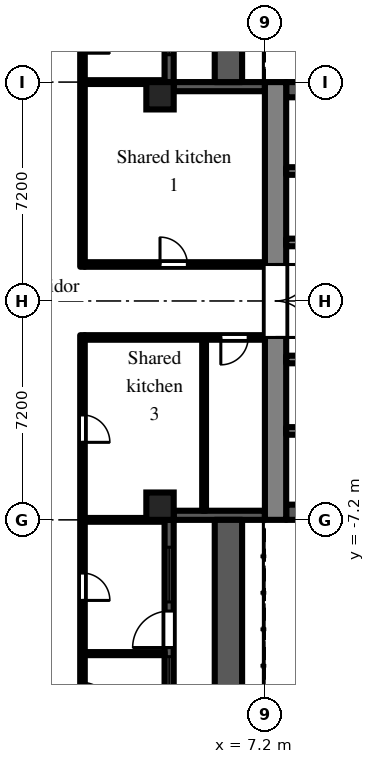
"""IFC4 building model, lengths in metres.
Left out: names, types, materials, properties, quantities, classifications, styles, units other than length and angle.
Written with IfcOpenShell. Run it as: python <this file> out.ifc"""

import sys

from ifc_helpers import new_model, si_unit, direction, frame, frame_2d, origin, origin_2d, place, context, subcontext, project, spatial, rectangle, extrude, element, fill, save


model = new_model("IFC4")
c1 = context("Model", 3, precision=1e-05, world=origin(), true_north=direction((0.0, 1.0)))
c2 = subcontext(c1, "Body", "Model", "MODEL_VIEW")
j1 = project(units=[si_unit("LENGTHUNIT", "METRE"), si_unit("PLANEANGLEUNIT", "RADIAN")], contexts=[c1])
p1 = place(None, origin())
s1 = spatial("IfcSite", under=j1, at=p1, CompositionType="ELEMENT")
p2 = place(p1, origin())
s2 = spatial("IfcBuilding", under=s1, at=p2, CompositionType="ELEMENT")
p3 = place(p2, frame((0.0, 0.0, 66.9)))
s3 = spatial("IfcBuildingStorey", under=s2, at=p3, CompositionType="ELEMENT", Elevation=66.9)
for number, where, z_axis, x_axis in (
    (1, (3.75, -6.75, 0.0), (0.0, 0.0, 1.0), (1.0, 0.0, 0.0)),
    (2, (3.75, 6.75, 0.0), (0.0, 0.0, 1.0), (1.0, 0.0, 0.0)),
):
    element("IfcColumn", number, at=place(p3, frame(where, z_axis=z_axis, x_axis=x_axis)), inside=s3, PredefinedType="COLUMN", context=c2, shape_type="SweptSolid", body=[
        extrude(rectangle(XDim=0.9, YDim=0.9, at=origin_2d()), origin(), (0.0, 0.0, 1.0), 3.0),
    ])
p4 = place(p3, frame((7.2, 7.05, 0.0), z_axis=(0.0, 0.0, 1.0), x_axis=(-1.0, 0.0, 0.0)))
e3 = element("IfcWall", 3, at=p4, inside=s3, PredefinedType="SOLIDWALL", context=c2, shape_type="SweptSolid", body=[
    extrude(rectangle(XDim=3.0, YDim=0.3, at=frame_2d((1.5, 0.0))), origin(), (0.0, 0.0, 1.0), 2.1),
])
p5 = place(p3, frame((4.05, 7.2, 0.0), z_axis=(0.0, 0.0, 1.0), x_axis=(0.0, 1.0, 0.0)))
e4 = element("IfcWall", 4, at=p5, inside=s3, PredefinedType="SOLIDWALL", context=c2, shape_type="SweptSolid", body=[
    extrude(rectangle(XDim=7.2, YDim=0.3, at=frame_2d((3.6, 0.0))), origin(), (0.0, 0.0, 1.0), 2.1),
])
p6 = place(p5, frame((3.0, 0.0, 0.0)))
e5 = element("IfcOpeningElement", 5, at=p6, cuts=e4, PredefinedType="OPENING", context=c2, shape_type="SweptSolid", body=[
    extrude(rectangle(XDim=1.2, YDim=2.05, at=frame_2d((0.6, 1.025))), frame((0.0, 0.16, 0.0), z_axis=(0.0, -1.0, 0.0), x_axis=(1.0, 0.0, 0.0)), (0.0, 0.0, 1.0), 0.32),
])
p7 = place(p5, frame((0.9, 0.0, 0.2)))
e6 = element("IfcOpeningElement", 6, at=p7, cuts=e4, PredefinedType="OPENING", context=c2, shape_type="SweptSolid", body=[
    extrude(rectangle(XDim=1.8, YDim=1.85, at=frame_2d((0.9, 0.925))), frame((0.0, 0.16, 0.0), z_axis=(0.0, -1.0, 0.0), x_axis=(1.0, 0.0, 0.0)), (0.0, 0.0, 1.0), 0.32),
])
p8 = place(p5, frame((4.5, 0.0, 0.2)))
e7 = element("IfcOpeningElement", 7, at=p8, cuts=e4, PredefinedType="OPENING", context=c2, shape_type="SweptSolid", body=[
    extrude(rectangle(XDim=1.8, YDim=1.85, at=frame_2d((0.9, 0.925))), frame((0.0, 0.16, 0.0), z_axis=(0.0, -1.0, 0.0), x_axis=(1.0, 0.0, 0.0)), (0.0, 0.0, 1.0), 0.32),
])
p9 = place(p3, frame((4.05, -14.4, 0.0), z_axis=(0.0, 0.0, 1.0), x_axis=(0.0, 1.0, 0.0)))
e8 = element("IfcWall", 8, at=p9, inside=s3, PredefinedType="SOLIDWALL", context=c2, shape_type="SweptSolid", body=[
    extrude(rectangle(XDim=7.2, YDim=0.3, at=frame_2d((3.6, 0.0))), origin(), (0.0, 0.0, 1.0), 2.1),
])
p10 = place(p9, frame((3.0, 0.0, 0.0)))
e9 = element("IfcOpeningElement", 9, at=p10, cuts=e8, PredefinedType="OPENING", context=c2, shape_type="SweptSolid", body=[
    extrude(rectangle(XDim=1.2, YDim=2.05, at=frame_2d((0.6, 1.025))), frame((0.0, 0.16, 0.0), z_axis=(0.0, -1.0, 0.0), x_axis=(1.0, 0.0, 0.0)), (0.0, 0.0, 1.0), 0.32),
])
p11 = place(p9, frame((0.9, 0.0, 0.2)))
e10 = element("IfcOpeningElement", 10, at=p11, cuts=e8, PredefinedType="OPENING", context=c2, shape_type="SweptSolid", body=[
    extrude(rectangle(XDim=1.8, YDim=1.85, at=frame_2d((0.9, 0.925))), frame((0.0, 0.16, 0.0), z_axis=(0.0, -1.0, 0.0), x_axis=(1.0, 0.0, 0.0)), (0.0, 0.0, 1.0), 0.32),
])
p12 = place(p9, frame((4.5, 0.0, 0.2)))
e11 = element("IfcOpeningElement", 11, at=p12, cuts=e8, PredefinedType="OPENING", context=c2, shape_type="SweptSolid", body=[
    extrude(rectangle(XDim=1.8, YDim=1.85, at=frame_2d((0.9, 0.925))), frame((0.0, 0.16, 0.0), z_axis=(0.0, -1.0, 0.0), x_axis=(1.0, 0.0, 0.0)), (0.0, 0.0, 1.0), 0.32),
])
p13 = place(p3, frame((4.2, -7.05, 0.0), z_axis=(0.0, 0.0, 1.0), x_axis=(1.0, 0.0, 0.0)))
e12 = element("IfcWall", 12, at=p13, inside=s3, PredefinedType="SOLIDWALL", context=c2, shape_type="SweptSolid", body=[
    extrude(rectangle(XDim=3.0, YDim=0.3, at=frame_2d((1.5, 0.0))), origin(), (0.0, 0.0, 1.0), 2.1),
])
for number, where, z_axis, x_axis in (
    (13, (6.0, 7.2, 0.0), (0.0, 0.0, 1.0), (0.0, 1.0, 0.0)),
    (14, (6.0, -14.4, 0.0), (0.0, 0.0, 1.0), (0.0, 1.0, 0.0)),
):
    element("IfcWall", number, at=place(p3, frame(where, z_axis=z_axis, x_axis=x_axis)), inside=s3, PredefinedType="PARAPET", context=c2, shape_type="SweptSolid", body=[
        extrude(rectangle(XDim=7.2, YDim=0.9, at=frame_2d((3.6, 0.0))), origin(), (0.0, 0.0, 1.0), 0.8),
    ])
p14 = place(p3, frame((7.55, -7.2, 0.0), z_axis=(0.0, 0.0, 1.0), x_axis=(0.0, 1.0, 0.0)))
e15 = element("IfcWall", 15, at=p14, inside=s3, PredefinedType="SHEAR", context=c2, shape_type="SweptSolid", body=[
    extrude(rectangle(XDim=14.4, YDim=0.7, at=frame_2d((7.2, 0.0))), origin(), (0.0, 0.0, 1.0), 2.575),
])
p15 = place(p14, frame((6.0, 0.0, 0.0)))
e16 = element("IfcOpeningElement", 16, at=p15, cuts=e15, PredefinedType="OPENING", context=c2, shape_type="SweptSolid", body=[
    extrude(rectangle(XDim=2.4, YDim=2.2, at=frame_2d((1.2, 1.1))), frame((0.0, 0.36, 0.0), z_axis=(0.0, -1.0, 0.0), x_axis=(1.0, 0.0, 0.0)), (0.0, 0.0, 1.0), 0.72),
])
p16 = place(p3, frame((7.9, 6.95, 0.0), z_axis=(0.0, 0.0, 1.0), x_axis=(1.0, 0.0, 0.0)))
e17 = element("IfcWall", 17, at=p16, inside=s3, PredefinedType="SHEAR", context=c2, shape_type="SweptSolid", body=[
    extrude(rectangle(XDim=12.95, YDim=0.5, at=frame_2d((6.475, 0.0))), origin(), (0.0, 0.0, 1.0), 2.575),
])
p17 = place(p3, frame((7.9, 1.925, 0.0), z_axis=(0.0, 0.0, 1.0), x_axis=(1.0, 0.0, 0.0)))
e18 = element("IfcWall", 18, at=p17, inside=s3, PredefinedType="SHEAR", context=c2, shape_type="SweptSolid", body=[
    extrude(rectangle(XDim=12.95, YDim=0.25, at=frame_2d((6.475, 0.0))), origin(), (0.0, 0.0, 1.0), 2.575),
])
p18 = place(p17, frame((0.525, 0.0, 0.0)))
e19 = element("IfcOpeningElement", 19, at=p18, cuts=e18, PredefinedType="OPENING", context=c2, shape_type="SweptSolid", body=[
    extrude(rectangle(XDim=0.9, YDim=2.1, at=frame_2d((0.45, 1.05))), frame((0.0, 0.135, 0.0), z_axis=(0.0, -1.0, 0.0), x_axis=(1.0, 0.0, 0.0)), (0.0, 0.0, 1.0), 0.27),
])
p19 = place(p17, frame((2.625, 0.0, 0.0)))
e20 = element("IfcOpeningElement", 20, at=p19, cuts=e18, PredefinedType="OPENING", context=c2, shape_type="SweptSolid", body=[
    extrude(rectangle(XDim=1.1, YDim=2.1, at=frame_2d((0.55, 1.05))), frame((0.0, 0.135, 0.0), z_axis=(0.0, -1.0, 0.0), x_axis=(1.0, 0.0, 0.0)), (0.0, 0.0, 1.0), 0.27),
])
p20 = place(p17, frame((7.125, 0.0, 0.0)))
e21 = element("IfcOpeningElement", 21, at=p20, cuts=e18, PredefinedType="OPENING", context=c2, shape_type="SweptSolid", body=[
    extrude(rectangle(XDim=0.9, YDim=2.1, at=frame_2d((0.45, 1.05))), frame((0.0, 0.135, 0.0), z_axis=(0.0, -1.0, 0.0), x_axis=(1.0, 0.0, 0.0)), (0.0, 0.0, 1.0), 0.27),
])
p21 = place(p3, frame((7.9, 4.275, 0.0), z_axis=(0.0, 0.0, 1.0), x_axis=(1.0, 0.0, 0.0)))
e22 = element("IfcWall", 22, at=p21, inside=s3, PredefinedType="SHEAR", context=c2, shape_type="SweptSolid", body=[
    extrude(rectangle(XDim=1.95, YDim=0.25, at=frame_2d((0.975, 0.0))), origin(), (0.0, 0.0, 1.0), 2.575),
])
p22 = place(p3, frame((7.9, -6.95, 0.0), z_axis=(0.0, 0.0, 1.0), x_axis=(1.0, 0.0, 0.0)))
e23 = element("IfcWall", 23, at=p22, inside=s3, PredefinedType="SHEAR", context=c2, shape_type="SweptSolid", body=[
    extrude(rectangle(XDim=12.95, YDim=0.5, at=frame_2d((6.475, 0.0))), origin(), (0.0, 0.0, 1.0), 2.575),
])
p23 = place(p3, frame((7.9, -1.925, 0.0), z_axis=(0.0, 0.0, 1.0), x_axis=(1.0, 0.0, 0.0)))
e24 = element("IfcWall", 24, at=p23, inside=s3, PredefinedType="SHEAR", context=c2, shape_type="SweptSolid", body=[
    extrude(rectangle(XDim=12.95, YDim=0.25, at=frame_2d((6.475, 0.0))), origin(), (0.0, 0.0, 1.0), 2.575),
])
p24 = place(p23, frame((4.825, 0.0, 0.0)))
e25 = element("IfcOpeningElement", 25, at=p24, cuts=e24, PredefinedType="OPENING", context=c2, shape_type="SweptSolid", body=[
    extrude(rectangle(XDim=1.1, YDim=2.1, at=frame_2d((0.55, 1.05))), frame((0.0, 0.135, 0.0), z_axis=(0.0, -1.0, 0.0), x_axis=(1.0, 0.0, 0.0)), (0.0, 0.0, 1.0), 0.27),
])
p25 = place(p23, frame((7.025, 0.0, 0.0)))
e26 = element("IfcOpeningElement", 26, at=p25, cuts=e24, PredefinedType="OPENING", context=c2, shape_type="SweptSolid", body=[
    extrude(rectangle(XDim=1.1, YDim=2.1, at=frame_2d((0.55, 1.05))), frame((0.0, 0.135, 0.0), z_axis=(0.0, -1.0, 0.0), x_axis=(1.0, 0.0, 0.0)), (0.0, 0.0, 1.0), 0.27),
])
p26 = place(p23, frame((9.225, 0.0, 0.0)))
e27 = element("IfcOpeningElement", 27, at=p26, cuts=e24, PredefinedType="OPENING", context=c2, shape_type="SweptSolid", body=[
    extrude(rectangle(XDim=1.1, YDim=2.1, at=frame_2d((0.55, 1.05))), frame((0.0, 0.135, 0.0), z_axis=(0.0, -1.0, 0.0), x_axis=(1.0, 0.0, 0.0)), (0.0, 0.0, 1.0), 0.27),
])
p27 = place(p23, frame((0.525, 0.0, 0.0)))
e28 = element("IfcOpeningElement", 28, at=p27, cuts=e24, PredefinedType="OPENING", context=c2, shape_type="SweptSolid", body=[
    extrude(rectangle(XDim=0.9, YDim=2.1, at=frame_2d((0.45, 1.05))), frame((0.0, 0.135, 0.0), z_axis=(0.0, -1.0, 0.0), x_axis=(1.0, 0.0, 0.0)), (0.0, 0.0, 1.0), 0.27),
])
p28 = place(p23, frame((2.625, 0.0, 0.0)))
e29 = element("IfcOpeningElement", 29, at=p28, cuts=e24, PredefinedType="OPENING", context=c2, shape_type="SweptSolid", body=[
    extrude(rectangle(XDim=1.1, YDim=2.1, at=frame_2d((0.55, 1.05))), frame((0.0, 0.135, 0.0), z_axis=(0.0, -1.0, 0.0), x_axis=(1.0, 0.0, 0.0)), (0.0, 0.0, 1.0), 0.27),
])
p29 = place(p3, frame((7.9, -4.275, 0.0), z_axis=(0.0, 0.0, 1.0), x_axis=(1.0, 0.0, 0.0)))
e30 = element("IfcWall", 30, at=p29, inside=s3, PredefinedType="SHEAR", context=c2, shape_type="SweptSolid", body=[
    extrude(rectangle(XDim=1.95, YDim=0.25, at=frame_2d((0.975, 0.0))), origin(), (0.0, 0.0, 1.0), 2.575),
])
p30 = place(p3, frame((1.2, -36.5, 0.0), z_axis=(0.0, 0.0, 1.0), x_axis=(0.0, 1.0, 0.0)))
e31 = element("IfcWall", 31, at=p30, inside=s3, PredefinedType="PARTITIONING", context=c2, shape_type="SweptSolid", body=[
    extrude(rectangle(XDim=35.375, YDim=0.15, at=frame_2d((17.688, 0.0))), origin(), (0.0, 0.0, 1.0), 2.575),
])
p31 = place(p30, frame((31.85, 0.0, 0.0)))
e32 = element("IfcOpeningElement", 32, at=p31, cuts=e31, PredefinedType="OPENING", context=c2, shape_type="SweptSolid", body=[
    extrude(rectangle(XDim=0.9, YDim=2.1, at=frame_2d((0.45, 1.05))), frame((0.0, 0.085, 0.0), z_axis=(0.0, -1.0, 0.0), x_axis=(1.0, 0.0, 0.0)), (0.0, 0.0, 1.0), 0.17),
])
p32 = place(p30, frame((23.05, 0.0, 0.0)))
e33 = element("IfcOpeningElement", 33, at=p32, cuts=e31, PredefinedType="OPENING", context=c2, shape_type="SweptSolid", body=[
    extrude(rectangle(XDim=0.9, YDim=2.1, at=frame_2d((0.45, 1.05))), frame((0.0, 0.085, 0.0), z_axis=(0.0, -1.0, 0.0), x_axis=(1.0, 0.0, 0.0)), (0.0, 0.0, 1.0), 0.17),
])
p33 = place(p30, frame((26.65, 0.0, 0.0)))
e34 = element("IfcOpeningElement", 34, at=p33, cuts=e31, PredefinedType="OPENING", context=c2, shape_type="SweptSolid", body=[
    extrude(rectangle(XDim=0.9, YDim=2.1, at=frame_2d((0.45, 1.05))), frame((0.0, 0.085, 0.0), z_axis=(0.0, -1.0, 0.0), x_axis=(1.0, 0.0, 0.0)), (0.0, 0.0, 1.0), 0.17),
])
p34 = place(p30, frame((20.5, 0.0, 0.0)))
e35 = element("IfcOpeningElement", 35, at=p34, cuts=e31, PredefinedType="OPENING", context=c2, shape_type="SweptSolid", body=[
    extrude(rectangle(XDim=1.0, YDim=2.1, at=frame_2d((0.5, 1.05))), frame((0.0, 0.085, 0.0), z_axis=(0.0, -1.0, 0.0), x_axis=(1.0, 0.0, 0.0)), (0.0, 0.0, 1.0), 0.17),
])
p35 = place(p30, frame((1.55, 0.0, 0.0)))
e36 = element("IfcOpeningElement", 36, at=p35, cuts=e31, PredefinedType="OPENING", context=c2, shape_type="SweptSolid", body=[
    extrude(rectangle(XDim=1.0, YDim=2.1, at=frame_2d((0.5, 1.05))), frame((0.0, 0.085, 0.0), z_axis=(0.0, -1.0, 0.0), x_axis=(1.0, 0.0, 0.0)), (0.0, 0.0, 1.0), 0.17),
])
p36 = place(p3, frame((1.275, -11.6, 0.0), z_axis=(0.0, 0.0, 1.0), x_axis=(1.0, 0.0, 0.0)))
e37 = element("IfcWall", 37, at=p36, inside=s3, PredefinedType="PARTITIONING", context=c2, shape_type="SweptSolid", body=[
    extrude(rectangle(XDim=2.625, YDim=0.1, at=frame_2d((1.312, 0.0))), origin(), (0.0, 0.0, 1.0), 2.575),
])
p37 = place(p3, frame((1.275, -7.2, 0.0), z_axis=(0.0, 0.0, 1.0), x_axis=(1.0, 0.0, 0.0)))
e38 = element("IfcWall", 38, at=p37, inside=s3, PredefinedType="PARTITIONING", context=c2, shape_type="SweptSolid", body=[
    extrude(rectangle(XDim=2.625, YDim=0.125, at=frame_2d((1.312, 0.0))), origin(), (0.0, 0.0, 1.0), 2.575),
])
p38 = place(p3, frame((1.275, -1.2, 0.0), z_axis=(0.0, 0.0, 1.0), x_axis=(1.0, 0.0, 0.0)))
e39 = element("IfcWall", 39, at=p38, inside=s3, PredefinedType="PARTITIONING", context=c2, shape_type="SweptSolid", body=[
    extrude(rectangle(XDim=5.925, YDim=0.15, at=frame_2d((2.962, 0.0))), origin(), (0.0, 0.0, 1.0), 2.575),
])
p39 = place(p38, frame((4.475, 0.0, 0.0)))
e40 = element("IfcOpeningElement", 40, at=p39, cuts=e39, PredefinedType="OPENING", context=c2, shape_type="SweptSolid", body=[
    extrude(rectangle(XDim=0.9, YDim=2.1, at=frame_2d((0.45, 1.05))), frame((0.0, 0.085, 0.0), z_axis=(0.0, -1.0, 0.0), x_axis=(1.0, 0.0, 0.0)), (0.0, 0.0, 1.0), 0.17),
])
p40 = place(p3, frame((1.2, 1.125, 0.0), z_axis=(0.0, 0.0, 1.0), x_axis=(0.0, 1.0, 0.0)))
e41 = element("IfcWall", 41, at=p40, inside=s3, PredefinedType="PARTITIONING", context=c2, shape_type="SweptSolid", body=[
    extrude(rectangle(XDim=16.8, YDim=0.15, at=frame_2d((8.4, 0.0))), origin(), (0.0, 0.0, 1.0), 2.575),
])
p41 = place(p40, frame((7.025, 0.0, 0.0)))
e42 = element("IfcOpeningElement", 42, at=p41, cuts=e41, PredefinedType="OPENING", context=c2, shape_type="SweptSolid", body=[
    extrude(rectangle(XDim=0.9, YDim=2.1, at=frame_2d((0.45, 1.05))), frame((0.0, 0.085, 0.0), z_axis=(0.0, -1.0, 0.0), x_axis=(1.0, 0.0, 0.0)), (0.0, 0.0, 1.0), 0.17),
])
p42 = place(p40, frame((10.625, 0.0, 0.0)))
e43 = element("IfcOpeningElement", 43, at=p42, cuts=e41, PredefinedType="OPENING", context=c2, shape_type="SweptSolid", body=[
    extrude(rectangle(XDim=0.9, YDim=2.1, at=frame_2d((0.45, 1.05))), frame((0.0, 0.085, 0.0), z_axis=(0.0, -1.0, 0.0), x_axis=(1.0, 0.0, 0.0)), (0.0, 0.0, 1.0), 0.17),
])
p43 = place(p40, frame((13.475, 0.0, 0.0)))
e44 = element("IfcOpeningElement", 44, at=p43, cuts=e41, PredefinedType="OPENING", context=c2, shape_type="SweptSolid", body=[
    extrude(rectangle(XDim=1.0, YDim=2.1, at=frame_2d((0.5, 1.05))), frame((0.0, 0.085, 0.0), z_axis=(0.0, -1.0, 0.0), x_axis=(1.0, 0.0, 0.0)), (0.0, 0.0, 1.0), 0.17),
])
p44 = place(p3, frame((1.275, 1.2, 0.0), z_axis=(0.0, 0.0, 1.0), x_axis=(1.0, 0.0, 0.0)))
e45 = element("IfcWall", 45, at=p44, inside=s3, PredefinedType="PARTITIONING", context=c2, shape_type="SweptSolid", body=[
    extrude(rectangle(XDim=5.925, YDim=0.15, at=frame_2d((2.962, 0.0))), origin(), (0.0, 0.0, 1.0), 2.575),
])
p45 = place(p44, frame((2.475, 0.0, 0.0)))
e46 = element("IfcOpeningElement", 46, at=p45, cuts=e45, PredefinedType="OPENING", context=c2, shape_type="SweptSolid", body=[
    extrude(rectangle(XDim=0.9, YDim=2.1, at=frame_2d((0.45, 1.05))), frame((0.0, 0.085, 0.0), z_axis=(0.0, -1.0, 0.0), x_axis=(1.0, 0.0, 0.0)), (0.0, 0.0, 1.0), 0.17),
])
p46 = place(p3, frame((1.275, 7.2, 0.0), z_axis=(0.0, 0.0, 1.0), x_axis=(1.0, 0.0, 0.0)))
e47 = element("IfcWall", 47, at=p46, inside=s3, PredefinedType="PARTITIONING", context=c2, shape_type="SweptSolid", body=[
    extrude(rectangle(XDim=2.625, YDim=0.125, at=frame_2d((1.312, 0.0))), origin(), (0.0, 0.0, 1.0), 2.575),
])
p47 = place(p3, frame((5.2, -6.9, 0.0), z_axis=(0.0, 0.0, 1.0), x_axis=(0.0, 1.0, 0.0)))
e48 = element("IfcWall", 48, at=p47, inside=s3, PredefinedType="PARTITIONING", context=c2, shape_type="SweptSolid", body=[
    extrude(rectangle(XDim=5.625, YDim=0.125, at=frame_2d((2.812, 0.0))), origin(), (0.0, 0.0, 1.0), 2.575),
])
p48 = place(p7, origin())
e49 = element("IfcWindow", 49, at=p48, inside=s3, PartitioningType="SINGLE_PANEL", PredefinedType="WINDOW", context=c2, shape_type="SweptSolid", body=[
    extrude(rectangle(XDim=1.8, YDim=1.85, at=frame_2d((0.9, 0.925))), frame((0.0, 0.03, 0.0), z_axis=(0.0, -1.0, 0.0), x_axis=(1.0, 0.0, 0.0)), (0.0, 0.0, 1.0), 0.06),
])
fill(e6, e49)
p49 = place(p10, origin())
e50 = element("IfcDoor", 50, at=p49, inside=s3, OperationType="SINGLE_SWING_LEFT", PredefinedType="DOOR", context=c2, shape_type="SweptSolid", body=[
    extrude(rectangle(XDim=1.2, YDim=2.05, at=frame_2d((0.6, 1.025))), frame((0.0, 0.025, 0.0), z_axis=(0.0, -1.0, 0.0), x_axis=(1.0, 0.0, 0.0)), (0.0, 0.0, 1.0), 0.05),
])
fill(e9, e50)
p50 = place(p11, origin())
e51 = element("IfcWindow", 51, at=p50, inside=s3, PartitioningType="SINGLE_PANEL", PredefinedType="WINDOW", context=c2, shape_type="SweptSolid", body=[
    extrude(rectangle(XDim=1.8, YDim=1.85, at=frame_2d((0.9, 0.925))), frame((0.0, 0.03, 0.0), z_axis=(0.0, -1.0, 0.0), x_axis=(1.0, 0.0, 0.0)), (0.0, 0.0, 1.0), 0.06),
])
fill(e10, e51)
p51 = place(p12, origin())
e52 = element("IfcWindow", 52, at=p51, inside=s3, PartitioningType="SINGLE_PANEL", PredefinedType="WINDOW", context=c2, shape_type="SweptSolid", body=[
    extrude(rectangle(XDim=1.8, YDim=1.85, at=frame_2d((0.9, 0.925))), frame((0.0, 0.03, 0.0), z_axis=(0.0, -1.0, 0.0), x_axis=(1.0, 0.0, 0.0)), (0.0, 0.0, 1.0), 0.06),
])
fill(e11, e52)
p52 = place(p15, frame((2.4, 0.0, 0.0), z_axis=(0.0, 0.0, 1.0), x_axis=(-1.0, 0.0, 0.0)))
e53 = element("IfcDoor", 53, at=p52, inside=s3, OperationType="DOUBLE_DOOR_DOUBLE_SWING", PredefinedType="DOOR", context=c2, shape_type="SweptSolid", body=[
    extrude(rectangle(XDim=2.4, YDim=2.2, at=frame_2d((1.2, 1.1))), frame((0.0, 0.025, 0.0), z_axis=(0.0, -1.0, 0.0), x_axis=(1.0, 0.0, 0.0)), (0.0, 0.0, 1.0), 0.05),
])
fill(e16, e53)
p53 = place(p45, origin())
e54 = element("IfcDoor", 54, at=p53, inside=s3, OperationType="SINGLE_SWING_LEFT", PredefinedType="DOOR", context=c2, shape_type="SweptSolid", body=[
    extrude(rectangle(XDim=0.9, YDim=2.1, at=frame_2d((0.45, 1.05))), frame((0.0, 0.025, 0.0), z_axis=(0.0, -1.0, 0.0), x_axis=(1.0, 0.0, 0.0)), (0.0, 0.0, 1.0), 0.05),
])
fill(e46, e54)
p54 = place(p31, frame((0.9, 0.0, 0.0), z_axis=(0.0, 0.0, 1.0), x_axis=(-1.0, 0.0, 0.0)))
e55 = element("IfcDoor", 55, at=p54, inside=s3, OperationType="SINGLE_SWING_RIGHT", PredefinedType="DOOR", context=c2, shape_type="SweptSolid", body=[
    extrude(rectangle(XDim=0.9, YDim=2.1, at=frame_2d((0.45, 1.05))), frame((0.0, 0.025, 0.0), z_axis=(0.0, -1.0, 0.0), x_axis=(1.0, 0.0, 0.0)), (0.0, 0.0, 1.0), 0.05),
])
fill(e32, e55)
p55 = place(p39, frame((0.9, 0.0, 0.0), z_axis=(0.0, 0.0, 1.0), x_axis=(-1.0, 0.0, 0.0)))
e56 = element("IfcDoor", 56, at=p55, inside=s3, OperationType="SINGLE_SWING_RIGHT", PredefinedType="DOOR", context=c2, shape_type="SweptSolid", body=[
    extrude(rectangle(XDim=0.9, YDim=2.1, at=frame_2d((0.45, 1.05))), frame((0.0, 0.025, 0.0), z_axis=(0.0, -1.0, 0.0), x_axis=(1.0, 0.0, 0.0)), (0.0, 0.0, 1.0), 0.05),
])
fill(e40, e56)
p56 = place(p41, frame((0.9, 0.0, 0.0), z_axis=(0.0, 0.0, 1.0), x_axis=(-1.0, 0.0, 0.0)))
e57 = element("IfcDoor", 57, at=p56, inside=s3, OperationType="SINGLE_SWING_RIGHT", PredefinedType="DOOR", context=c2, shape_type="SweptSolid", body=[
    extrude(rectangle(XDim=0.9, YDim=2.1, at=frame_2d((0.45, 1.05))), frame((0.0, 0.025, 0.0), z_axis=(0.0, -1.0, 0.0), x_axis=(1.0, 0.0, 0.0)), (0.0, 0.0, 1.0), 0.05),
])
fill(e42, e57)
p57 = place(p32, frame((0.9, 0.0, 0.0), z_axis=(0.0, 0.0, 1.0), x_axis=(-1.0, 0.0, 0.0)))
e58 = element("IfcDoor", 58, at=p57, inside=s3, OperationType="SINGLE_SWING_RIGHT", PredefinedType="DOOR", context=c2, shape_type="SweptSolid", body=[
    extrude(rectangle(XDim=0.9, YDim=2.1, at=frame_2d((0.45, 1.05))), frame((0.0, 0.025, 0.0), z_axis=(0.0, -1.0, 0.0), x_axis=(1.0, 0.0, 0.0)), (0.0, 0.0, 1.0), 0.05),
])
fill(e33, e58)
p58 = place(p33, frame((0.9, 0.0, 0.0), z_axis=(0.0, 0.0, 1.0), x_axis=(-1.0, 0.0, 0.0)))
e59 = element("IfcDoor", 59, at=p58, inside=s3, OperationType="SINGLE_SWING_RIGHT", PredefinedType="DOOR", context=c2, shape_type="SweptSolid", body=[
    extrude(rectangle(XDim=0.9, YDim=2.1, at=frame_2d((0.45, 1.05))), frame((0.0, 0.025, 0.0), z_axis=(0.0, -1.0, 0.0), x_axis=(1.0, 0.0, 0.0)), (0.0, 0.0, 1.0), 0.05),
])
fill(e34, e59)
save(model, sys.argv[1])
